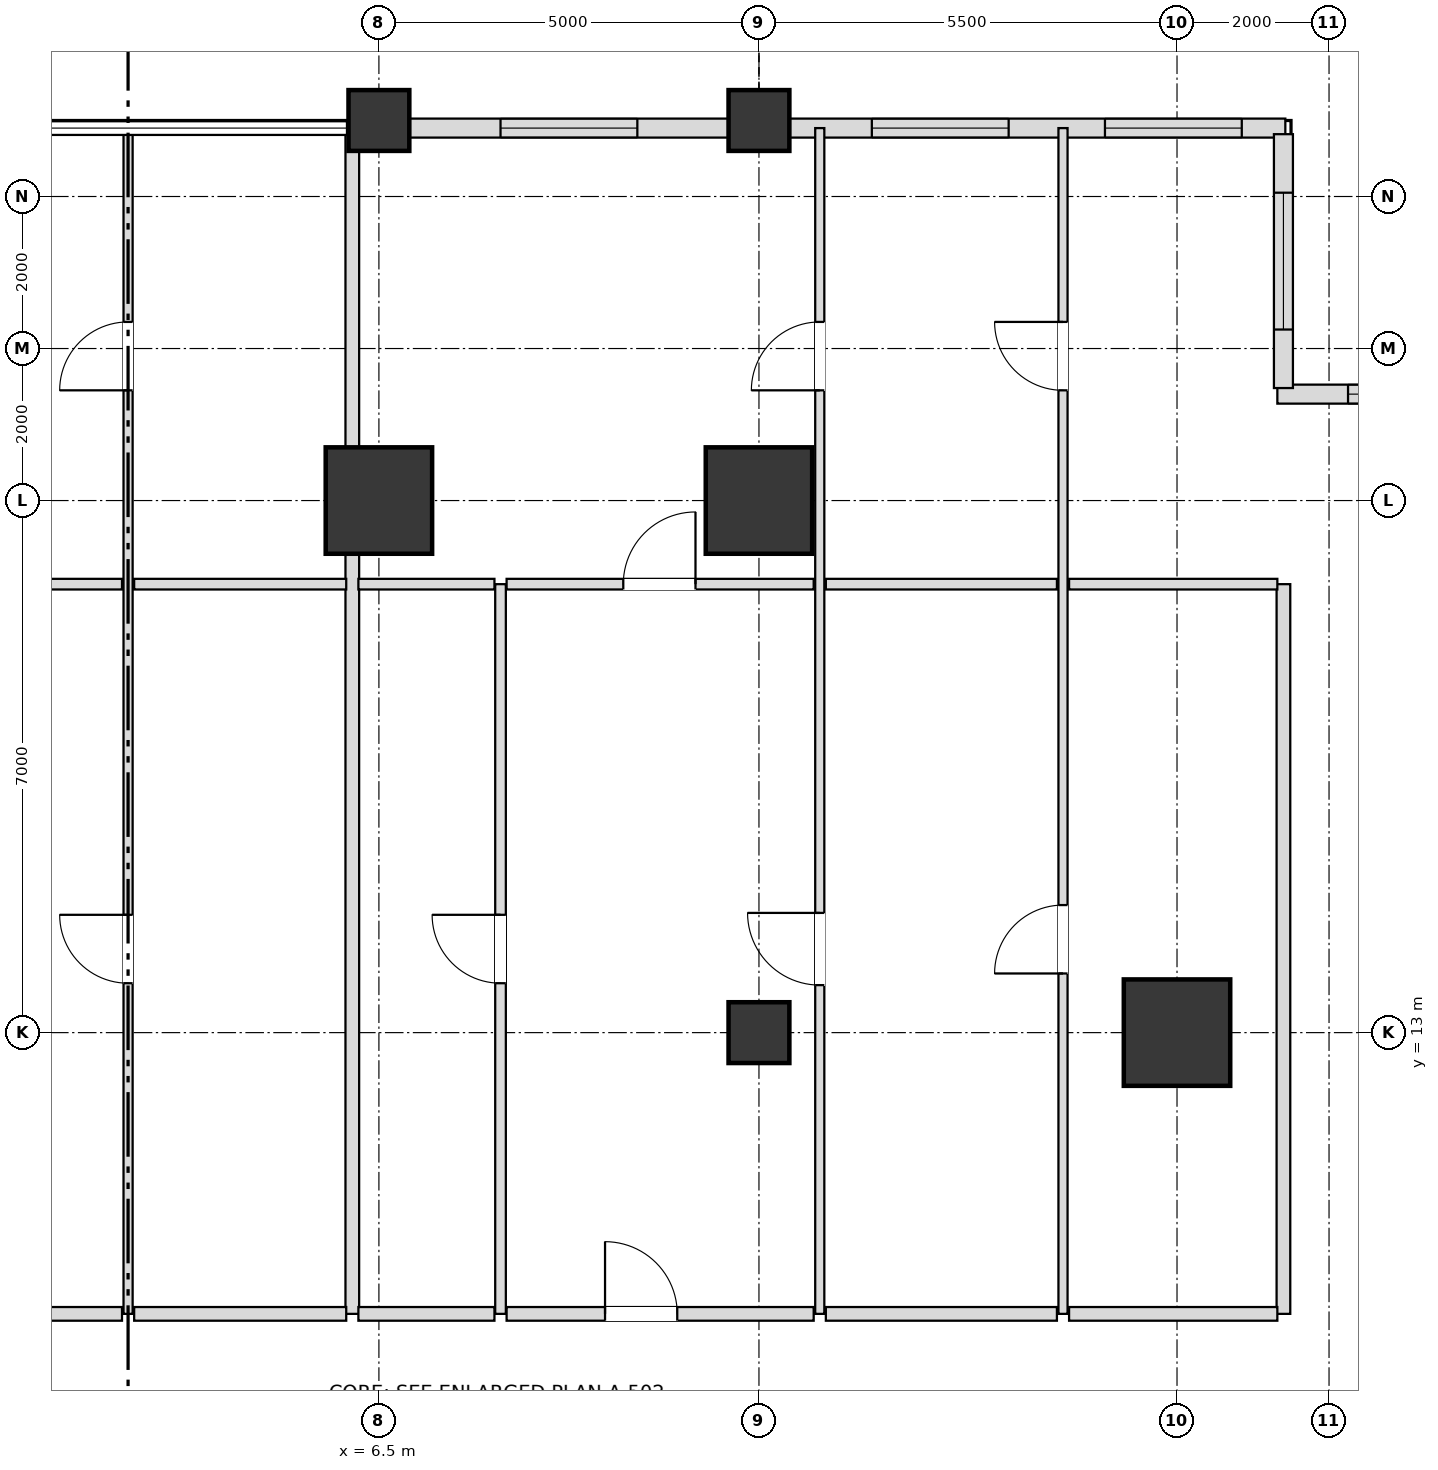
"""IFC4 building model, lengths in metres.
Left out: names, types, materials, properties, quantities, classifications, styles, units other than length and angle.
Written with IfcOpenShell. Run it as: python <this file> out.ifc"""

import sys

from ifc_helpers import new_model, si_unit, direction, frame, frame_2d, origin, origin_2d, place, context, subcontext, project, spatial, rectangle, extrude, element, fill, save


model = new_model("IFC4")
c1 = context("Model", 3, precision=1e-05, world=origin(), true_north=direction((0.0, 1.0)))
c2 = subcontext(c1, "Body", "Model", "MODEL_VIEW")
j1 = project(units=[si_unit("LENGTHUNIT", "METRE"), si_unit("PLANEANGLEUNIT", "RADIAN")], contexts=[c1])
p1 = place(None, origin())
s1 = spatial("IfcSite", under=j1, at=p1, CompositionType="ELEMENT")
p2 = place(p1, origin())
s2 = spatial("IfcBuilding", under=s1, at=p2, CompositionType="ELEMENT")
p3 = place(p2, frame((0.0, 0.0, 39.6)))
s3 = spatial("IfcBuildingStorey", under=s2, at=p3, CompositionType="ELEMENT", Elevation=39.6)
for number, where, z_axis, x_axis in (
    (1, (17.0, 13.0, 0.0), (0.0, 0.0, 1.0), (1.0, 0.0, 0.0)),
    (2, (11.5, 20.0, 0.0), (0.0, 0.0, 1.0), (1.0, 0.0, 0.0)),
    (3, (6.5, 20.0, 0.0), (0.0, 0.0, 1.0), (1.0, 0.0, 0.0)),
):
    element("IfcColumn", number, at=place(p3, frame(where, z_axis=z_axis, x_axis=x_axis)), inside=s3, PredefinedType="USERDEFINED", context=c2, shape_type="SweptSolid", body=[
        extrude(rectangle(XDim=1.4, YDim=1.4, at=origin_2d()), origin(), (0.0, 0.0, 1.0), 3.6),
    ])
for number, where, z_axis, x_axis in (
    (4, (11.5, 13.0, 0.0), (0.0, 0.0, 1.0), (1.0, 0.0, 0.0)),
    (5, (6.5, 25.0, 0.0), (0.0, 0.0, 1.0), (1.0, 0.0, 0.0)),
    (6, (11.5, 25.0, 0.0), (0.0, 0.0, 1.0), (1.0, 0.0, 0.0)),
):
    element("IfcColumn", number, at=place(p3, frame(where, z_axis=z_axis, x_axis=x_axis)), inside=s3, PredefinedType="COLUMN", context=c2, shape_type="SweptSolid", body=[
        extrude(rectangle(XDim=0.8, YDim=0.8, at=origin_2d()), origin(), (0.0, 0.0, 1.0), 3.6),
    ])
p4 = place(p3, frame((18.425, 24.9, 0.0), z_axis=(0.0, 0.0, 1.0), x_axis=(-1.0, 0.0, 0.0)))
e7 = element("IfcWall", 7, at=p4, inside=s3, PredefinedType="SOLIDWALL", context=c2, shape_type="SweptSolid", body=[
    extrude(rectangle(XDim=6.53, YDim=0.25, at=frame_2d((3.265, 0.0))), origin(), (0.0, 0.0, 1.0), 2.736),
])
p5 = place(p4, frame((0.573, 0.0, 0.72)))
e8 = element("IfcOpeningElement", 8, at=p5, cuts=e7, PredefinedType="OPENING", context=c2, shape_type="SweptSolid", body=[
    extrude(rectangle(XDim=1.8, YDim=1.68, at=frame_2d((0.9, 0.84))), frame((0.0, 0.135, 0.0), z_axis=(0.0, -1.0, 0.0), x_axis=(1.0, 0.0, 0.0)), (0.0, 0.0, 1.0), 0.27),
])
p6 = place(p4, frame((3.64, 0.0, 0.72)))
e9 = element("IfcOpeningElement", 9, at=p6, cuts=e7, PredefinedType="OPENING", context=c2, shape_type="SweptSolid", body=[
    extrude(rectangle(XDim=1.8, YDim=1.68, at=frame_2d((0.9, 0.84))), frame((0.0, 0.135, 0.0), z_axis=(0.0, -1.0, 0.0), x_axis=(1.0, 0.0, 0.0)), (0.0, 0.0, 1.0), 0.27),
])
p7 = place(p3, frame((11.105, 24.9, 0.0), z_axis=(0.0, 0.0, 1.0), x_axis=(-1.0, 0.0, 0.0)))
e10 = element("IfcWall", 10, at=p7, inside=s3, PredefinedType="SOLIDWALL", context=c2, shape_type="SweptSolid", body=[
    extrude(rectangle(XDim=4.21, YDim=0.25, at=frame_2d((2.105, 0.0))), origin(), (0.0, 0.0, 1.0), 2.736),
])
p8 = place(p7, frame((1.205, 0.0, 0.72)))
e11 = element("IfcOpeningElement", 11, at=p8, cuts=e10, PredefinedType="OPENING", context=c2, shape_type="SweptSolid", body=[
    extrude(rectangle(XDim=1.8, YDim=1.68, at=frame_2d((0.9, 0.84))), frame((0.0, 0.135, 0.0), z_axis=(0.0, -1.0, 0.0), x_axis=(1.0, 0.0, 0.0)), (0.0, 0.0, 1.0), 0.27),
])
p9 = place(p3, frame((21.98, 21.4, 0.0), z_axis=(0.0, 0.0, 1.0), x_axis=(-1.0, 0.0, 0.0)))
e12 = element("IfcWall", 12, at=p9, inside=s3, PredefinedType="SOLIDWALL", context=c2, shape_type="SweptSolid", body=[
    extrude(rectangle(XDim=3.66, YDim=0.25, at=frame_2d((1.83, 0.0))), origin(), (0.0, 0.0, 1.0), 2.736),
])
p10 = place(p9, frame((0.93, 0.0, 0.72)))
e13 = element("IfcOpeningElement", 13, at=p10, cuts=e12, PredefinedType="OPENING", context=c2, shape_type="SweptSolid", body=[
    extrude(rectangle(XDim=1.8, YDim=1.68, at=frame_2d((0.9, 0.84))), frame((0.0, 0.135, 0.0), z_axis=(0.0, -1.0, 0.0), x_axis=(1.0, 0.0, 0.0)), (0.0, 0.0, 1.0), 0.27),
])
p11 = place(p3, frame((18.4, 21.48, 0.0), z_axis=(0.0, 0.0, 1.0), x_axis=(0.0, 1.0, 0.0)))
e14 = element("IfcWall", 14, at=p11, inside=s3, PredefinedType="SOLIDWALL", context=c2, shape_type="SweptSolid", body=[
    extrude(rectangle(XDim=3.34, YDim=0.25, at=frame_2d((1.67, 0.0))), origin(), (0.0, 0.0, 1.0), 2.736),
])
p12 = place(p11, frame((0.77, 0.0, 0.72)))
e15 = element("IfcOpeningElement", 15, at=p12, cuts=e14, PredefinedType="OPENING", context=c2, shape_type="SweptSolid", body=[
    extrude(rectangle(XDim=1.8, YDim=1.68, at=frame_2d((0.9, 0.84))), frame((0.0, 0.135, 0.0), z_axis=(0.0, -1.0, 0.0), x_axis=(1.0, 0.0, 0.0)), (0.0, 0.0, 1.0), 0.27),
])
p13 = place(p3, frame((3.2, 9.3, 0.0), z_axis=(0.0, 0.0, 1.0), x_axis=(0.0, 1.0, 0.0)))
e16 = element("IfcWall", 16, at=p13, inside=s3, PredefinedType="PARTITIONING", context=c2, shape_type="SweptSolid", body=[
    extrude(rectangle(XDim=15.6, YDim=0.12, at=frame_2d((7.8, 0.0))), origin(), (0.0, 0.0, 1.0), 2.816),
])
p14 = place(p13, frame((4.35, 0.0, 0.0)))
e17 = element("IfcOpeningElement", 17, at=p14, cuts=e16, PredefinedType="OPENING", context=c2, shape_type="SweptSolid", body=[
    extrude(rectangle(XDim=0.9, YDim=2.1, at=frame_2d((0.45, 1.05))), frame((0.0, 0.07, 0.0), z_axis=(0.0, -1.0, 0.0), x_axis=(1.0, 0.0, 0.0)), (0.0, 0.0, 1.0), 0.14),
])
p15 = place(p13, frame((12.15, 0.0, 0.0)))
e18 = element("IfcOpeningElement", 18, at=p15, cuts=e16, PredefinedType="OPENING", context=c2, shape_type="SweptSolid", body=[
    extrude(rectangle(XDim=0.9, YDim=2.1, at=frame_2d((0.45, 1.05))), frame((0.0, 0.07, 0.0), z_axis=(0.0, -1.0, 0.0), x_axis=(1.0, 0.0, 0.0)), (0.0, 0.0, 1.0), 0.14),
])
p16 = place(p3, frame((6.15, 9.3, 0.0), z_axis=(0.0, 0.0, 1.0), x_axis=(0.0, 1.0, 0.0)))
e19 = element("IfcWall", 19, at=p16, inside=s3, PredefinedType="PARTITIONING", context=c2, shape_type="SweptSolid", body=[
    extrude(rectangle(XDim=15.6, YDim=0.18, at=frame_2d((7.8, 0.0))), origin(), (0.0, 0.0, 1.0), 2.816),
])
p17 = place(p3, frame((8.1, 9.3, 0.0), z_axis=(0.0, 0.0, 1.0), x_axis=(0.0, 1.0, 0.0)))
e20 = element("IfcWall", 20, at=p17, inside=s3, PredefinedType="PARTITIONING", context=c2, shape_type="SweptSolid", body=[
    extrude(rectangle(XDim=9.6, YDim=0.14, at=frame_2d((4.8, 0.0))), origin(), (0.0, 0.0, 1.0), 2.816),
])
p18 = place(p17, frame((4.35, 0.0, 0.0)))
e21 = element("IfcOpeningElement", 21, at=p18, cuts=e20, PredefinedType="OPENING", context=c2, shape_type="SweptSolid", body=[
    extrude(rectangle(XDim=0.9, YDim=2.1, at=frame_2d((0.45, 1.05))), frame((0.0, 0.08, 0.0), z_axis=(0.0, -1.0, 0.0), x_axis=(1.0, 0.0, 0.0)), (0.0, 0.0, 1.0), 0.16),
])
p19 = place(p3, frame((12.3, 9.3, 0.0), z_axis=(0.0, 0.0, 1.0), x_axis=(0.0, 1.0, 0.0)))
e22 = element("IfcWall", 22, at=p19, inside=s3, PredefinedType="PARTITIONING", context=c2, shape_type="SweptSolid", body=[
    extrude(rectangle(XDim=15.6, YDim=0.12, at=frame_2d((7.8, 0.0))), origin(), (0.0, 0.0, 1.0), 2.736),
])
p20 = place(p19, frame((4.325, 0.0, 0.0)))
e23 = element("IfcOpeningElement", 23, at=p20, cuts=e22, PredefinedType="OPENING", context=c2, shape_type="SweptSolid", body=[
    extrude(rectangle(XDim=0.95, YDim=2.1, at=frame_2d((0.475, 1.05))), frame((0.0, 0.07, 0.0), z_axis=(0.0, -1.0, 0.0), x_axis=(1.0, 0.0, 0.0)), (0.0, 0.0, 1.0), 0.14),
])
p21 = place(p19, frame((12.15, 0.0, 0.0)))
e24 = element("IfcOpeningElement", 24, at=p21, cuts=e22, PredefinedType="OPENING", context=c2, shape_type="SweptSolid", body=[
    extrude(rectangle(XDim=0.9, YDim=2.1, at=frame_2d((0.45, 1.05))), frame((0.0, 0.07, 0.0), z_axis=(0.0, -1.0, 0.0), x_axis=(1.0, 0.0, 0.0)), (0.0, 0.0, 1.0), 0.14),
])
p22 = place(p3, frame((15.5, 9.3, 0.0), z_axis=(0.0, 0.0, 1.0), x_axis=(0.0, 1.0, 0.0)))
e25 = element("IfcWall", 25, at=p22, inside=s3, PredefinedType="PARTITIONING", context=c2, shape_type="SweptSolid", body=[
    extrude(rectangle(XDim=15.6, YDim=0.12, at=frame_2d((7.8, 0.0))), origin(), (0.0, 0.0, 1.0), 2.736),
])
p23 = place(p22, frame((4.478, 0.0, 0.0)))
e26 = element("IfcOpeningElement", 26, at=p23, cuts=e25, PredefinedType="OPENING", context=c2, shape_type="SweptSolid", body=[
    extrude(rectangle(XDim=0.9, YDim=2.1, at=frame_2d((0.45, 1.05))), frame((0.0, 0.07, 0.0), z_axis=(0.0, -1.0, 0.0), x_axis=(1.0, 0.0, 0.0)), (0.0, 0.0, 1.0), 0.14),
])
p24 = place(p22, frame((12.15, 0.0, 0.0)))
e27 = element("IfcOpeningElement", 27, at=p24, cuts=e25, PredefinedType="OPENING", context=c2, shape_type="SweptSolid", body=[
    extrude(rectangle(XDim=0.9, YDim=2.1, at=frame_2d((0.45, 1.05))), frame((0.0, 0.07, 0.0), z_axis=(0.0, -1.0, 0.0), x_axis=(1.0, 0.0, 0.0)), (0.0, 0.0, 1.0), 0.14),
])
p25 = place(p3, frame((18.4, 9.3, 0.0), z_axis=(0.0, 0.0, 1.0), x_axis=(0.0, 1.0, 0.0)))
e28 = element("IfcWall", 28, at=p25, inside=s3, PredefinedType="PARTITIONING", context=c2, shape_type="SweptSolid", body=[
    extrude(rectangle(XDim=9.6, YDim=0.18, at=frame_2d((4.8, 0.0))), origin(), (0.0, 0.0, 1.0), 2.736),
])
p26 = place(p3, frame((0.08, 9.3, 0.0), z_axis=(0.0, 0.0, 1.0), x_axis=(1.0, 0.0, 0.0)))
e29 = element("IfcWall", 29, at=p26, inside=s3, PredefinedType="PARTITIONING", context=c2, shape_type="SweptSolid", body=[
    extrude(rectangle(XDim=3.04, YDim=0.18, at=frame_2d((1.52, 0.0))), origin(), (0.0, 0.0, 1.0), 3.38),
])
p27 = place(p3, frame((3.28, 9.3, 0.0), z_axis=(0.0, 0.0, 1.0), x_axis=(1.0, 0.0, 0.0)))
e30 = element("IfcWall", 30, at=p27, inside=s3, PredefinedType="PARTITIONING", context=c2, shape_type="SweptSolid", body=[
    extrude(rectangle(XDim=2.79, YDim=0.18, at=frame_2d((1.395, 0.0))), origin(), (0.0, 0.0, 1.0), 3.38),
])
p28 = place(p3, frame((6.23, 9.3, 0.0), z_axis=(0.0, 0.0, 1.0), x_axis=(1.0, 0.0, 0.0)))
e31 = element("IfcWall", 31, at=p28, inside=s3, PredefinedType="PARTITIONING", context=c2, shape_type="SweptSolid", body=[
    extrude(rectangle(XDim=1.79, YDim=0.18, at=frame_2d((0.895, 0.0))), origin(), (0.0, 0.0, 1.0), 2.816),
])
p29 = place(p3, frame((8.18, 9.3, 0.0), z_axis=(0.0, 0.0, 1.0), x_axis=(1.0, 0.0, 0.0)))
e32 = element("IfcWall", 32, at=p29, inside=s3, PredefinedType="PARTITIONING", context=c2, shape_type="SweptSolid", body=[
    extrude(rectangle(XDim=4.04, YDim=0.18, at=frame_2d((2.02, 0.0))), origin(), (0.0, 0.0, 1.0), 3.38),
])
p30 = place(p29, frame((1.295, 0.0, 0.0)))
e33 = element("IfcOpeningElement", 33, at=p30, cuts=e32, PredefinedType="OPENING", context=c2, shape_type="SweptSolid", body=[
    extrude(rectangle(XDim=0.95, YDim=2.15, at=frame_2d((0.475, 1.075))), frame((0.0, 0.1, 0.0), z_axis=(0.0, -1.0, 0.0), x_axis=(1.0, 0.0, 0.0)), (0.0, 0.0, 1.0), 0.2),
])
p31 = place(p3, frame((12.38, 9.3, 0.0), z_axis=(0.0, 0.0, 1.0), x_axis=(1.0, 0.0, 0.0)))
e34 = element("IfcWall", 34, at=p31, inside=s3, PredefinedType="PARTITIONING", context=c2, shape_type="SweptSolid", body=[
    extrude(rectangle(XDim=3.04, YDim=0.18, at=frame_2d((1.52, 0.0))), origin(), (0.0, 0.0, 1.0), 3.38),
])
p32 = place(p3, frame((15.58, 9.3, 0.0), z_axis=(0.0, 0.0, 1.0), x_axis=(1.0, 0.0, 0.0)))
e35 = element("IfcWall", 35, at=p32, inside=s3, PredefinedType="PARTITIONING", context=c2, shape_type="SweptSolid", body=[
    extrude(rectangle(XDim=2.74, YDim=0.18, at=frame_2d((1.37, 0.0))), origin(), (0.0, 0.0, 1.0), 2.816),
])
p33 = place(p3, frame((0.08, 18.9, 0.0), z_axis=(0.0, 0.0, 1.0), x_axis=(1.0, 0.0, 0.0)))
e36 = element("IfcWall", 36, at=p33, inside=s3, PredefinedType="PARTITIONING", context=c2, shape_type="SweptSolid", body=[
    extrude(rectangle(XDim=3.04, YDim=0.14, at=frame_2d((1.52, 0.0))), origin(), (0.0, 0.0, 1.0), 3.38),
])
p34 = place(p3, frame((3.28, 18.9, 0.0), z_axis=(0.0, 0.0, 1.0), x_axis=(1.0, 0.0, 0.0)))
e37 = element("IfcWall", 37, at=p34, inside=s3, PredefinedType="PARTITIONING", context=c2, shape_type="SweptSolid", body=[
    extrude(rectangle(XDim=2.79, YDim=0.14, at=frame_2d((1.395, 0.0))), origin(), (0.0, 0.0, 1.0), 3.38),
])
p35 = place(p3, frame((6.23, 18.9, 0.0), z_axis=(0.0, 0.0, 1.0), x_axis=(1.0, 0.0, 0.0)))
e38 = element("IfcWall", 38, at=p35, inside=s3, PredefinedType="PARTITIONING", context=c2, shape_type="SweptSolid", body=[
    extrude(rectangle(XDim=1.79, YDim=0.14, at=frame_2d((0.895, 0.0))), origin(), (0.0, 0.0, 1.0), 2.816),
])
p36 = place(p3, frame((8.18, 18.9, 0.0), z_axis=(0.0, 0.0, 1.0), x_axis=(1.0, 0.0, 0.0)))
e39 = element("IfcWall", 39, at=p36, inside=s3, PredefinedType="PARTITIONING", context=c2, shape_type="SweptSolid", body=[
    extrude(rectangle(XDim=4.04, YDim=0.14, at=frame_2d((2.02, 0.0))), origin(), (0.0, 0.0, 1.0), 2.736),
])
p37 = place(p36, frame((1.535, 0.0, 0.0)))
e40 = element("IfcOpeningElement", 40, at=p37, cuts=e39, PredefinedType="OPENING", context=c2, shape_type="SweptSolid", body=[
    extrude(rectangle(XDim=0.95, YDim=2.1, at=frame_2d((0.475, 1.05))), frame((0.0, 0.08, 0.0), z_axis=(0.0, -1.0, 0.0), x_axis=(1.0, 0.0, 0.0)), (0.0, 0.0, 1.0), 0.16),
])
p38 = place(p3, frame((12.38, 18.9, 0.0), z_axis=(0.0, 0.0, 1.0), x_axis=(1.0, 0.0, 0.0)))
e41 = element("IfcWall", 41, at=p38, inside=s3, PredefinedType="PARTITIONING", context=c2, shape_type="SweptSolid", body=[
    extrude(rectangle(XDim=3.04, YDim=0.14, at=frame_2d((1.52, 0.0))), origin(), (0.0, 0.0, 1.0), 2.736),
])
p39 = place(p3, frame((15.58, 18.9, 0.0), z_axis=(0.0, 0.0, 1.0), x_axis=(1.0, 0.0, 0.0)))
e42 = element("IfcWall", 42, at=p39, inside=s3, PredefinedType="PARTITIONING", context=c2, shape_type="SweptSolid", body=[
    extrude(rectangle(XDim=2.74, YDim=0.14, at=frame_2d((1.37, 0.0))), origin(), (0.0, 0.0, 1.0), 2.736),
])
p40 = place(p5, origin())
e43 = element("IfcWindow", 43, at=p40, inside=s3, PartitioningType="SINGLE_PANEL", PredefinedType="WINDOW", context=c2, shape_type="SweptSolid", body=[
    extrude(rectangle(XDim=1.8, YDim=1.68, at=frame_2d((0.9, 0.84))), frame((0.0, 0.03, 0.0), z_axis=(0.0, -1.0, 0.0), x_axis=(1.0, 0.0, 0.0)), (0.0, 0.0, 1.0), 0.06),
])
fill(e8, e43)
p41 = place(p6, origin())
e44 = element("IfcWindow", 44, at=p41, inside=s3, PartitioningType="SINGLE_PANEL", PredefinedType="WINDOW", context=c2, shape_type="SweptSolid", body=[
    extrude(rectangle(XDim=1.8, YDim=1.68, at=frame_2d((0.9, 0.84))), frame((0.0, 0.03, 0.0), z_axis=(0.0, -1.0, 0.0), x_axis=(1.0, 0.0, 0.0)), (0.0, 0.0, 1.0), 0.06),
])
fill(e9, e44)
p42 = place(p8, origin())
e45 = element("IfcWindow", 45, at=p42, inside=s3, PartitioningType="SINGLE_PANEL", PredefinedType="WINDOW", context=c2, shape_type="SweptSolid", body=[
    extrude(rectangle(XDim=1.8, YDim=1.68, at=frame_2d((0.9, 0.84))), frame((0.0, 0.03, 0.0), z_axis=(0.0, -1.0, 0.0), x_axis=(1.0, 0.0, 0.0)), (0.0, 0.0, 1.0), 0.06),
])
fill(e11, e45)
p43 = place(p10, origin())
e46 = element("IfcWindow", 46, at=p43, inside=s3, PartitioningType="SINGLE_PANEL", PredefinedType="WINDOW", context=c2, shape_type="SweptSolid", body=[
    extrude(rectangle(XDim=1.8, YDim=1.68, at=frame_2d((0.9, 0.84))), frame((0.0, 0.03, 0.0), z_axis=(0.0, -1.0, 0.0), x_axis=(1.0, 0.0, 0.0)), (0.0, 0.0, 1.0), 0.06),
])
fill(e13, e46)
p44 = place(p12, origin())
e47 = element("IfcWindow", 47, at=p44, inside=s3, PartitioningType="SINGLE_PANEL", PredefinedType="WINDOW", context=c2, shape_type="SweptSolid", body=[
    extrude(rectangle(XDim=1.8, YDim=1.68, at=frame_2d((0.9, 0.84))), frame((0.0, 0.03, 0.0), z_axis=(0.0, -1.0, 0.0), x_axis=(1.0, 0.0, 0.0)), (0.0, 0.0, 1.0), 0.06),
])
fill(e15, e47)
p45 = place(p14, origin())
e48 = element("IfcDoor", 48, at=p45, inside=s3, OperationType="SINGLE_SWING_RIGHT", PredefinedType="DOOR", context=c2, shape_type="SweptSolid", body=[
    extrude(rectangle(XDim=0.9, YDim=2.1, at=frame_2d((0.45, 1.05))), frame((0.0, 0.025, 0.0), z_axis=(0.0, -1.0, 0.0), x_axis=(1.0, 0.0, 0.0)), (0.0, 0.0, 1.0), 0.05),
])
fill(e17, e48)
p46 = place(p15, origin())
e49 = element("IfcDoor", 49, at=p46, inside=s3, OperationType="SINGLE_SWING_LEFT", PredefinedType="DOOR", context=c2, shape_type="SweptSolid", body=[
    extrude(rectangle(XDim=0.9, YDim=2.1, at=frame_2d((0.45, 1.05))), frame((0.0, 0.025, 0.0), z_axis=(0.0, -1.0, 0.0), x_axis=(1.0, 0.0, 0.0)), (0.0, 0.0, 1.0), 0.05),
])
fill(e18, e49)
p47 = place(p18, origin())
e50 = element("IfcDoor", 50, at=p47, inside=s3, OperationType="SINGLE_SWING_RIGHT", PredefinedType="DOOR", context=c2, shape_type="SweptSolid", body=[
    extrude(rectangle(XDim=0.9, YDim=2.1, at=frame_2d((0.45, 1.05))), frame((0.0, 0.025, 0.0), z_axis=(0.0, -1.0, 0.0), x_axis=(1.0, 0.0, 0.0)), (0.0, 0.0, 1.0), 0.05),
])
fill(e21, e50)
p48 = place(p30, origin())
e51 = element("IfcDoor", 51, at=p48, inside=s3, OperationType="SINGLE_SWING_LEFT", PredefinedType="DOOR", context=c2, shape_type="SweptSolid", body=[
    extrude(rectangle(XDim=0.95, YDim=2.15, at=frame_2d((0.475, 1.075))), frame((0.0, 0.025, 0.0), z_axis=(0.0, -1.0, 0.0), x_axis=(1.0, 0.0, 0.0)), (0.0, 0.0, 1.0), 0.05),
])
fill(e33, e51)
p49 = place(p20, origin())
e52 = element("IfcDoor", 52, at=p49, inside=s3, OperationType="SINGLE_SWING_RIGHT", PredefinedType="DOOR", context=c2, shape_type="SweptSolid", body=[
    extrude(rectangle(XDim=0.95, YDim=2.1, at=frame_2d((0.475, 1.05))), frame((0.0, 0.025, 0.0), z_axis=(0.0, -1.0, 0.0), x_axis=(1.0, 0.0, 0.0)), (0.0, 0.0, 1.0), 0.05),
])
fill(e23, e52)
p50 = place(p23, origin())
e53 = element("IfcDoor", 53, at=p50, inside=s3, OperationType="SINGLE_SWING_LEFT", PredefinedType="DOOR", context=c2, shape_type="SweptSolid", body=[
    extrude(rectangle(XDim=0.9, YDim=2.1, at=frame_2d((0.45, 1.05))), frame((0.0, 0.025, 0.0), z_axis=(0.0, -1.0, 0.0), x_axis=(1.0, 0.0, 0.0)), (0.0, 0.0, 1.0), 0.05),
])
fill(e26, e53)
p51 = place(p37, origin())
e54 = element("IfcDoor", 54, at=p51, inside=s3, OperationType="SINGLE_SWING_RIGHT", PredefinedType="DOOR", context=c2, shape_type="SweptSolid", body=[
    extrude(rectangle(XDim=0.95, YDim=2.1, at=frame_2d((0.475, 1.05))), frame((0.0, 0.025, 0.0), z_axis=(0.0, -1.0, 0.0), x_axis=(1.0, 0.0, 0.0)), (0.0, 0.0, 1.0), 0.05),
])
fill(e40, e54)
p52 = place(p21, origin())
e55 = element("IfcDoor", 55, at=p52, inside=s3, OperationType="SINGLE_SWING_LEFT", PredefinedType="DOOR", context=c2, shape_type="SweptSolid", body=[
    extrude(rectangle(XDim=0.9, YDim=2.1, at=frame_2d((0.45, 1.05))), frame((0.0, 0.025, 0.0), z_axis=(0.0, -1.0, 0.0), x_axis=(1.0, 0.0, 0.0)), (0.0, 0.0, 1.0), 0.05),
])
fill(e24, e55)
p53 = place(p24, origin())
e56 = element("IfcDoor", 56, at=p53, inside=s3, OperationType="SINGLE_SWING_RIGHT", PredefinedType="DOOR", context=c2, shape_type="SweptSolid", body=[
    extrude(rectangle(XDim=0.9, YDim=2.1, at=frame_2d((0.45, 1.05))), frame((0.0, 0.025, 0.0), z_axis=(0.0, -1.0, 0.0), x_axis=(1.0, 0.0, 0.0)), (0.0, 0.0, 1.0), 0.05),
])
fill(e27, e56)
save(model, sys.argv[1])
